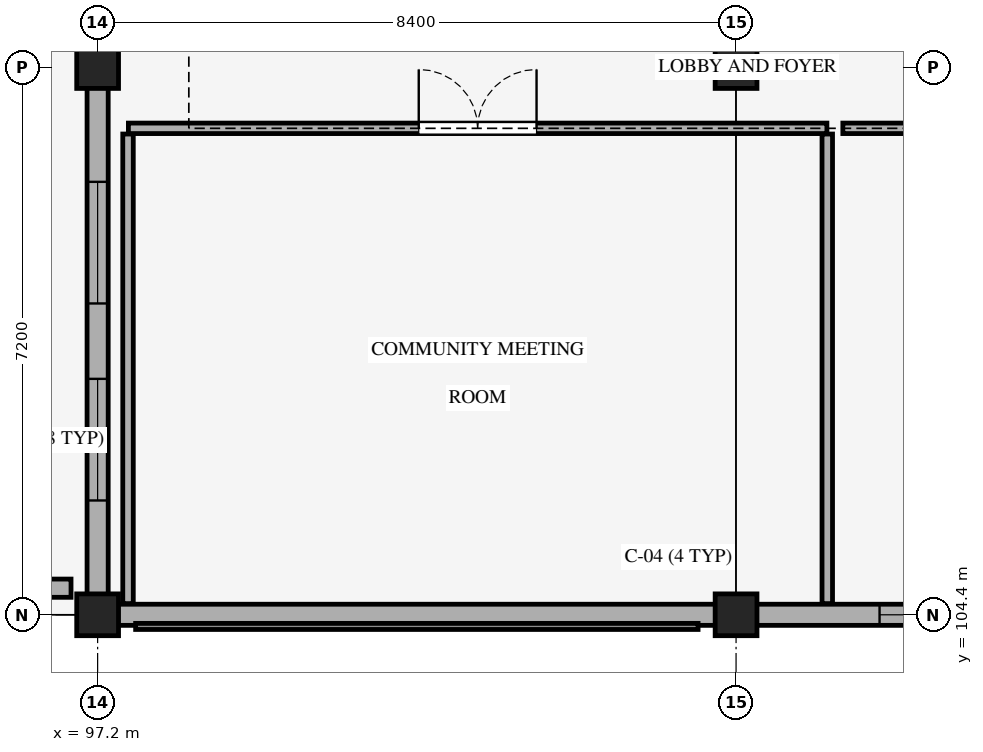
"""IFC4 building model, lengths in metres.
Left out: names, types, materials, properties, quantities, classifications, styles, units other than length and angle.
Written with IfcOpenShell. Run it as: python <this file> out.ifc"""

import sys

from ifc_helpers import new_model, si_unit, direction, frame, frame_2d, origin, origin_2d, place, context, subcontext, project, spatial, rectangle, extrude, element, fill, save


model = new_model("IFC4")
c1 = context("Model", 3, precision=1e-05, world=origin(), true_north=direction((0.0, 1.0)))
c2 = subcontext(c1, "Body", "Model", "MODEL_VIEW")
j1 = project(units=[si_unit("LENGTHUNIT", "METRE"), si_unit("PLANEANGLEUNIT", "RADIAN")], contexts=[c1])
p1 = place(None, origin())
s1 = spatial("IfcSite", under=j1, at=p1, CompositionType="ELEMENT")
p2 = place(p1, origin())
s2 = spatial("IfcBuilding", under=s1, at=p2, CompositionType="ELEMENT")
p3 = place(p2, frame((0.0, 0.0, 17.4)))
s3 = spatial("IfcBuildingStorey", under=s2, at=p3, CompositionType="ELEMENT", Elevation=17.4)
for number, where, z_axis, x_axis in (
    (1, (97.2, 104.4, 0.0), (0.0, 0.0, 1.0), (1.0, 0.0, 0.0)),
    (2, (97.2, 111.6, 0.0), (0.0, 0.0, 1.0), (1.0, 0.0, 0.0)),
    (3, (105.6, 104.4, 0.0), (0.0, 0.0, 1.0), (1.0, 0.0, 0.0)),
    (4, (105.6, 111.6, 0.0), (0.0, 0.0, 1.0), (1.0, 0.0, 0.0)),
):
    element("IfcColumn", number, at=place(p3, frame(where, z_axis=z_axis, x_axis=x_axis)), inside=s3, PredefinedType="COLUMN", context=c2, shape_type="SweptSolid", body=[
        extrude(rectangle(XDim=0.55, YDim=0.55, at=origin_2d()), origin(), (0.0, 0.0, 1.0), 4.2),
    ])
p4 = place(p3, frame((114.0, 104.4, 0.0), z_axis=(0.0, 0.0, 1.0), x_axis=(-1.0, 0.0, 0.0)))
e5 = element("IfcWall", 5, at=p4, inside=s3, PredefinedType="STANDARD", context=c2, shape_type="SweptSolid", body=[
    extrude(rectangle(XDim=8.4, YDim=0.278, at=frame_2d((4.2, 0.0))), origin(), (0.0, 0.0, 1.0), 3.305),
])
p5 = place(p4, frame((1.888, 0.0, 0.95)))
e6 = element("IfcOpeningElement", 6, at=p5, cuts=e5, PredefinedType="OPENING", context=c2, shape_type="SweptSolid", body=[
    extrude(rectangle(XDim=1.6, YDim=1.6, at=frame_2d((0.8, 0.8))), frame((0.0, 0.149, 0.0), z_axis=(0.0, -1.0, 0.0), x_axis=(1.0, 0.0, 0.0)), (0.0, 0.0, 1.0), 0.298),
])
p6 = place(p4, frame((4.912, 0.0, 0.95)))
e7 = element("IfcOpeningElement", 7, at=p6, cuts=e5, PredefinedType="OPENING", context=c2, shape_type="SweptSolid", body=[
    extrude(rectangle(XDim=1.6, YDim=1.6, at=frame_2d((0.8, 0.8))), frame((0.0, 0.149, 0.0), z_axis=(0.0, -1.0, 0.0), x_axis=(1.0, 0.0, 0.0)), (0.0, 0.0, 1.0), 0.298),
])
p7 = place(p3, frame((105.6, 104.4, 0.0), z_axis=(0.0, 0.0, 1.0), x_axis=(-1.0, 0.0, 0.0)))
e8 = element("IfcWall", 8, at=p7, inside=s3, PredefinedType="STANDARD", context=c2, shape_type="SweptSolid", body=[
    extrude(rectangle(XDim=8.4, YDim=0.278, at=frame_2d((4.2, 0.0))), origin(), (0.0, 0.0, 1.0), 3.305),
])
p8 = place(p3, frame((97.2, 104.4, 0.0), z_axis=(0.0, 0.0, 1.0), x_axis=(0.0, 1.0, 0.0)))
e9 = element("IfcWall", 9, at=p8, inside=s3, PredefinedType="STANDARD", context=c2, shape_type="SweptSolid", body=[
    extrude(rectangle(XDim=7.2, YDim=0.278, at=frame_2d((3.6, 0.0))), origin(), (0.0, 0.0, 1.0), 3.305),
])
p9 = place(p8, frame((1.504, 0.0, 0.95)))
e10 = element("IfcOpeningElement", 10, at=p9, cuts=e9, PredefinedType="OPENING", context=c2, shape_type="SweptSolid", body=[
    extrude(rectangle(XDim=1.6, YDim=1.6, at=frame_2d((0.8, 0.8))), frame((0.0, 0.149, 0.0), z_axis=(0.0, -1.0, 0.0), x_axis=(1.0, 0.0, 0.0)), (0.0, 0.0, 1.0), 0.298),
])
p10 = place(p8, frame((4.096, 0.0, 0.95)))
e11 = element("IfcOpeningElement", 11, at=p10, cuts=e9, PredefinedType="OPENING", context=c2, shape_type="SweptSolid", body=[
    extrude(rectangle(XDim=1.6, YDim=1.6, at=frame_2d((0.8, 0.8))), frame((0.0, 0.149, 0.0), z_axis=(0.0, -1.0, 0.0), x_axis=(1.0, 0.0, 0.0)), (0.0, 0.0, 1.0), 0.298),
])
p11 = place(p3, frame((97.2, 111.6, 0.0), z_axis=(0.0, 0.0, 1.0), x_axis=(0.0, 1.0, 0.0)))
e12 = element("IfcWall", 12, at=p11, inside=s3, PredefinedType="STANDARD", context=c2, shape_type="SweptSolid", body=[
    extrude(rectangle(XDim=7.2, YDim=0.278, at=frame_2d((3.6, 0.0))), origin(), (0.0, 0.0, 1.0), 3.255),
])
p12 = place(p11, frame((1.504, 0.0, 0.95)))
e13 = element("IfcOpeningElement", 13, at=p12, cuts=e12, PredefinedType="OPENING", context=c2, shape_type="SweptSolid", body=[
    extrude(rectangle(XDim=1.6, YDim=1.6, at=frame_2d((0.8, 0.8))), frame((0.0, 0.149, 0.0), z_axis=(0.0, -1.0, 0.0), x_axis=(1.0, 0.0, 0.0)), (0.0, 0.0, 1.0), 0.298),
])
p13 = place(p11, frame((4.096, 0.0, 0.95)))
e14 = element("IfcOpeningElement", 14, at=p13, cuts=e12, PredefinedType="OPENING", context=c2, shape_type="SweptSolid", body=[
    extrude(rectangle(XDim=1.6, YDim=1.6, at=frame_2d((0.8, 0.8))), frame((0.0, 0.149, 0.0), z_axis=(0.0, -1.0, 0.0), x_axis=(1.0, 0.0, 0.0)), (0.0, 0.0, 1.0), 0.298),
])
p14 = place(p3, frame((89.15, 104.75, 0.0), z_axis=(0.0, 0.0, 1.0), x_axis=(1.0, 0.0, 0.0)))
e15 = element("IfcWall", 15, at=p14, inside=s3, PredefinedType="PARAPET", context=c2, shape_type="SweptSolid", body=[
    extrude(rectangle(XDim=7.7, YDim=0.24, at=frame_2d((3.85, 0.0))), origin(), (0.0, 0.0, 1.0), 0.85),
])
p15 = place(p3, frame((106.8, 110.725, 0.0), z_axis=(0.0, 0.0, 1.0), x_axis=(0.0, -1.0, 0.0)))
e16 = element("IfcWall", 16, at=p15, inside=s3, PredefinedType="STANDARD", context=c2, shape_type="SweptSolid", body=[
    extrude(rectangle(XDim=6.178, YDim=0.138, at=frame_2d((3.089, 0.0))), origin(), (0.0, 0.0, 1.0), 3.98),
])
p16 = place(p3, frame((97.6, 104.547, 0.0), z_axis=(0.0, 0.0, 1.0), x_axis=(0.0, 1.0, 0.0)))
e17 = element("IfcWall", 17, at=p16, inside=s3, PredefinedType="STANDARD", context=c2, shape_type="SweptSolid", body=[
    extrude(rectangle(XDim=6.178, YDim=0.138, at=frame_2d((3.089, 0.0))), origin(), (0.0, 0.0, 1.0), 3.305),
])
p17 = place(p3, frame((97.605, 110.8, 0.0), z_axis=(0.0, 0.0, 1.0), x_axis=(1.0, 0.0, 0.0)))
e18 = element("IfcWall", 18, at=p17, inside=s3, PredefinedType="STANDARD", context=c2, shape_type="SweptSolid", body=[
    extrude(rectangle(XDim=9.19, YDim=0.138, at=frame_2d((4.595, 0.0))), origin(), (0.0, 0.0, 1.0), 3.755),
])
p18 = place(p17, frame((3.82, 0.0, 0.0)))
e19 = element("IfcOpeningElement", 19, at=p18, cuts=e18, PredefinedType="OPENING", context=c2, shape_type="SweptSolid", body=[
    extrude(rectangle(XDim=1.55, YDim=2.24, at=frame_2d((0.775, 1.12))), frame((0.0, 0.079, 0.0), z_axis=(0.0, -1.0, 0.0), x_axis=(1.0, 0.0, 0.0)), (0.0, 0.0, 1.0), 0.158),
])
p19 = place(p3, frame((107.005, 110.8, 0.0), z_axis=(0.0, 0.0, 1.0), x_axis=(1.0, 0.0, 0.0)))
e20 = element("IfcWall", 20, at=p19, inside=s3, PredefinedType="STANDARD", context=c2, shape_type="SweptSolid", body=[
    extrude(rectangle(XDim=6.79, YDim=0.138, at=frame_2d((3.395, 0.0))), origin(), (0.0, 0.0, 1.0), 3.98),
])
p20 = place(p19, frame((2.62, 0.0, 0.0)))
e21 = element("IfcOpeningElement", 21, at=p20, cuts=e20, PredefinedType="OPENING", context=c2, shape_type="SweptSolid", body=[
    extrude(rectangle(XDim=1.55, YDim=2.24, at=frame_2d((0.775, 1.12))), frame((0.0, 0.079, 0.0), z_axis=(0.0, -1.0, 0.0), x_axis=(1.0, 0.0, 0.0)), (0.0, 0.0, 1.0), 0.158),
])
p21 = place(p6, origin())
e22 = element("IfcWindow", 22, at=p21, inside=s3, PartitioningType="SINGLE_PANEL", PredefinedType="WINDOW", context=c2, shape_type="SweptSolid", body=[
    extrude(rectangle(XDim=1.6, YDim=1.6, at=frame_2d((0.8, 0.8))), frame((0.0, 0.03, 0.0), z_axis=(0.0, -1.0, 0.0), x_axis=(1.0, 0.0, 0.0)), (0.0, 0.0, 1.0), 0.06),
])
fill(e7, e22)
p22 = place(p9, origin())
e23 = element("IfcWindow", 23, at=p22, inside=s3, PartitioningType="SINGLE_PANEL", PredefinedType="WINDOW", context=c2, shape_type="SweptSolid", body=[
    extrude(rectangle(XDim=1.6, YDim=1.6, at=frame_2d((0.8, 0.8))), frame((0.0, 0.03, 0.0), z_axis=(0.0, -1.0, 0.0), x_axis=(1.0, 0.0, 0.0)), (0.0, 0.0, 1.0), 0.06),
])
fill(e10, e23)
p23 = place(p10, origin())
e24 = element("IfcWindow", 24, at=p23, inside=s3, PartitioningType="SINGLE_PANEL", PredefinedType="WINDOW", context=c2, shape_type="SweptSolid", body=[
    extrude(rectangle(XDim=1.6, YDim=1.6, at=frame_2d((0.8, 0.8))), frame((0.0, 0.03, 0.0), z_axis=(0.0, -1.0, 0.0), x_axis=(1.0, 0.0, 0.0)), (0.0, 0.0, 1.0), 0.06),
])
fill(e11, e24)
p24 = place(p18, origin())
e25 = element("IfcDoor", 25, at=p24, inside=s3, OperationType="DOUBLE_DOOR_SINGLE_SWING", PredefinedType="DOOR", context=c2, shape_type="SweptSolid", body=[
    extrude(rectangle(XDim=1.55, YDim=2.24, at=frame_2d((0.775, 1.12))), frame((0.0, 0.025, 0.0), z_axis=(0.0, -1.0, 0.0), x_axis=(1.0, 0.0, 0.0)), (0.0, 0.0, 1.0), 0.05),
])
fill(e19, e25)
save(model, sys.argv[1])
